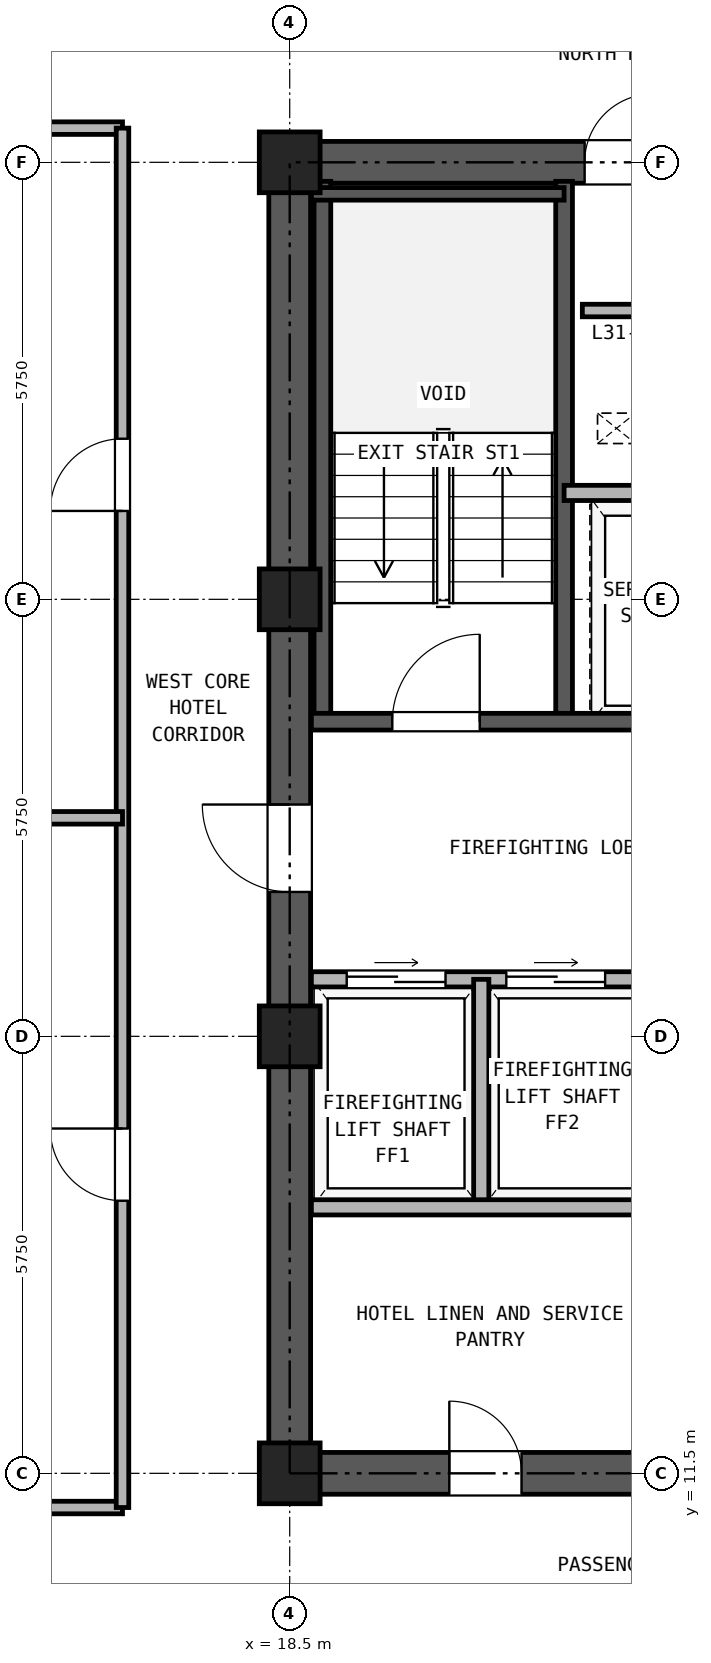
"""IFC4 building model, lengths in metres.
Left out: names, types, materials, properties, quantities, classifications, styles, units other than length and angle.
Written with IfcOpenShell. Run it as: python <this file> out.ifc"""

import sys

from ifc_helpers import new_model, si_unit, direction, frame, frame_2d, origin, origin_2d, place, context, subcontext, project, spatial, rectangle, hollow_rectangle, extrude, source, transform, mapped, element, fill, save


model = new_model("IFC4")
c1 = context("Model", 3, precision=1e-05, world=origin(), true_north=direction((0.0, 1.0)))
c2 = subcontext(c1, "Body", "Model", "MODEL_VIEW")
j1 = project(units=[si_unit("LENGTHUNIT", "METRE"), si_unit("PLANEANGLEUNIT", "RADIAN")], contexts=[c1])
p1 = place(None, origin())
s1 = spatial("IfcSite", under=j1, at=p1, CompositionType="ELEMENT")
p2 = place(p1, origin())
s2 = spatial("IfcBuilding", under=s1, at=p2, CompositionType="ELEMENT")
p3 = place(p2, frame((0.0, 0.0, 115.1)))
s3 = spatial("IfcBuildingStorey", under=s2, at=p3, CompositionType="ELEMENT", Elevation=115.1)
m1 = source(origin(), c2, "Body", "SweptSolid", [
    extrude(hollow_rectangle(XDim=0.8, YDim=0.8, WallThickness=0.045, at=origin_2d()), origin(), (0.0, 0.0, 1.0), 2.95),
])
for number, where, z_axis, x_axis in (
    (1, (18.5, 11.5, 0.0), (0.0, 0.0, 1.0), (1.0, 0.0, 0.0)),
    (2, (18.5, 17.25, 0.0), (0.0, 0.0, 1.0), (1.0, 0.0, 0.0)),
    (3, (18.5, 23.0, 0.0), (0.0, 0.0, 1.0), (1.0, 0.0, 0.0)),
    (4, (18.5, 28.75, 0.0), (0.0, 0.0, 1.0), (1.0, 0.0, 0.0)),
):
    element("IfcColumn", number, at=place(p3, frame(where, z_axis=z_axis, x_axis=x_axis)), inside=s3, PredefinedType="COLUMN", context=c2, shape_type="MappedRepresentation", body=[
        mapped(m1, transform((0.0, 0.0, 0.0), x_axis=(1.0, 0.0, 0.0), y_axis=(0.0, 1.0, 0.0), z_axis=(0.0, 0.0, 1.0), scale=1.0)),
    ])
p4 = place(p3, frame((18.225, 11.5, 0.0), z_axis=(0.0, 0.0, 1.0), x_axis=(1.0, 0.0, 0.0)))
e5 = element("IfcWall", 5, at=p4, inside=s3, PredefinedType="SHEAR", context=c2, shape_type="SweptSolid", body=[
    extrude(rectangle(XDim=10.55, YDim=0.55, at=frame_2d((5.275, 0.0))), origin(), (0.0, 0.0, 1.0), 2.95),
])
p5 = place(p4, frame((2.375, 0.0, 0.0)))
e6 = element("IfcOpeningElement", 6, at=p5, cuts=e5, PredefinedType="OPENING", context=c2, shape_type="SweptSolid", body=[
    extrude(rectangle(XDim=0.95, YDim=2.15, at=frame_2d((0.475, 1.075))), frame((0.0, 0.285, 0.0), z_axis=(0.0, -1.0, 0.0), x_axis=(1.0, 0.0, 0.0)), (0.0, 0.0, 1.0), 0.57),
])
p6 = place(p4, frame((5.875, 0.0, 0.0)))
e7 = element("IfcOpeningElement", 7, at=p6, cuts=e5, PredefinedType="OPENING", context=c2, shape_type="SweptSolid", body=[
    extrude(rectangle(XDim=1.1, YDim=2.25, at=frame_2d((0.55, 1.125))), frame((0.0, 0.285, 0.0), z_axis=(0.0, -1.0, 0.0), x_axis=(1.0, 0.0, 0.0)), (0.0, 0.0, 1.0), 0.57),
])
p7 = place(p4, frame((8.275, 0.0, 0.0)))
e8 = element("IfcOpeningElement", 8, at=p7, cuts=e5, PredefinedType="OPENING", context=c2, shape_type="SweptSolid", body=[
    extrude(rectangle(XDim=1.1, YDim=2.25, at=frame_2d((0.55, 1.125))), frame((0.0, 0.285, 0.0), z_axis=(0.0, -1.0, 0.0), x_axis=(1.0, 0.0, 0.0)), (0.0, 0.0, 1.0), 0.57),
])
p8 = place(p3, frame((18.225, 28.75, 0.0), z_axis=(0.0, 0.0, 1.0), x_axis=(1.0, 0.0, 0.0)))
e9 = element("IfcWall", 9, at=p8, inside=s3, PredefinedType="SHEAR", context=c2, shape_type="SweptSolid", body=[
    extrude(rectangle(XDim=10.55, YDim=0.55, at=frame_2d((5.275, 0.0))), origin(), (0.0, 0.0, 1.0), 2.95),
])
p9 = place(p8, frame((4.155, 0.0, 0.0)))
e10 = element("IfcOpeningElement", 10, at=p9, cuts=e9, PredefinedType="OPENING", context=c2, shape_type="SweptSolid", body=[
    extrude(rectangle(XDim=0.9, YDim=2.05, at=frame_2d((0.45, 1.025))), frame((0.0, 0.285, 0.0), z_axis=(0.0, -1.0, 0.0), x_axis=(1.0, 0.0, 0.0)), (0.0, 0.0, 1.0), 0.57),
])
p10 = place(p8, frame((5.695, 0.0, 0.0)))
e11 = element("IfcOpeningElement", 11, at=p10, cuts=e9, PredefinedType="OPENING", context=c2, shape_type="SweptSolid", body=[
    extrude(rectangle(XDim=0.9, YDim=2.05, at=frame_2d((0.45, 1.025))), frame((0.0, 0.285, 0.0), z_axis=(0.0, -1.0, 0.0), x_axis=(1.0, 0.0, 0.0)), (0.0, 0.0, 1.0), 0.57),
])
p11 = place(p3, frame((18.5, 11.775, 0.0), z_axis=(0.0, 0.0, 1.0), x_axis=(0.0, 1.0, 0.0)))
e12 = element("IfcWall", 12, at=p11, inside=s3, PredefinedType="SHEAR", context=c2, shape_type="SweptSolid", body=[
    extrude(rectangle(XDim=16.7, YDim=0.55, at=frame_2d((8.35, 0.0))), origin(), (0.0, 0.0, 1.0), 2.95),
])
p12 = place(p11, frame((7.375, 0.0, 0.0)))
e13 = element("IfcOpeningElement", 13, at=p12, cuts=e12, PredefinedType="OPENING", context=c2, shape_type="SweptSolid", body=[
    extrude(rectangle(XDim=1.15, YDim=2.2, at=frame_2d((0.575, 1.1))), frame((0.0, 0.285, 0.0), z_axis=(0.0, -1.0, 0.0), x_axis=(1.0, 0.0, 0.0)), (0.0, 0.0, 1.0), 0.57),
])
for number, where, z_axis, x_axis in (
    (14, (18.93, 21.39, 0.0), (0.0, 0.0, 1.0), (0.0, 1.0, 0.0)),
    (15, (22.11, 21.39, 0.0), (0.0, 0.0, 1.0), (0.0, 1.0, 0.0)),
):
    element("IfcWall", number, at=place(p3, frame(where, z_axis=z_axis, x_axis=x_axis)), inside=s3, PredefinedType="SOLIDWALL", context=c2, shape_type="SweptSolid", body=[
        extrude(rectangle(XDim=7.11, YDim=0.22, at=frame_2d((3.555, 0.0))), origin(), (0.0, 0.0, 1.0), 2.95),
    ])
p13 = place(p3, frame((18.785, 28.335, 0.0), z_axis=(0.0, 0.0, 1.0), x_axis=(1.0, 0.0, 0.0)))
e16 = element("IfcWall", 16, at=p13, inside=s3, PredefinedType="PARTITIONING", context=c2, shape_type="SweptSolid", body=[
    extrude(rectangle(XDim=3.325, YDim=0.165, at=frame_2d((1.663, 0.0))), origin(), (0.0, 0.0, 1.0), 2.95),
])
p14 = place(p3, frame((18.785, 21.39, 0.0), z_axis=(0.0, 0.0, 1.0), x_axis=(1.0, 0.0, 0.0)))
e17 = element("IfcWall", 17, at=p14, inside=s3, PredefinedType="SOLIDWALL", context=c2, shape_type="SweptSolid", body=[
    extrude(rectangle(XDim=6.345, YDim=0.22, at=frame_2d((3.172, 0.0))), origin(), (0.0, 0.0, 1.0), 2.95),
])
p15 = place(p14, frame((1.065, 0.0, 0.0)))
e18 = element("IfcOpeningElement", 18, at=p15, cuts=e17, PredefinedType="OPENING", context=c2, shape_type="SweptSolid", body=[
    extrude(rectangle(XDim=1.15, YDim=2.2, at=frame_2d((0.575, 1.1))), frame((0.0, 0.12, 0.0), z_axis=(0.0, -1.0, 0.0), x_axis=(1.0, 0.0, 0.0)), (0.0, 0.0, 1.0), 0.24),
])
p16 = place(p14, frame((4.795, 0.0, 0.0)))
e19 = element("IfcOpeningElement", 19, at=p16, cuts=e17, PredefinedType="OPENING", context=c2, shape_type="SweptSolid", body=[
    extrude(rectangle(XDim=1.1, YDim=2.25, at=frame_2d((0.55, 1.125))), frame((0.0, 0.12, 0.0), z_axis=(0.0, -1.0, 0.0), x_axis=(1.0, 0.0, 0.0)), (0.0, 0.0, 1.0), 0.24),
])
p17 = place(p3, frame((22.11, 24.4, 0.0), z_axis=(0.0, 0.0, 1.0), x_axis=(1.0, 0.0, 0.0)))
e20 = element("IfcWall", 20, at=p17, inside=s3, PredefinedType="PARTITIONING", context=c2, shape_type="SweptSolid", body=[
    extrude(rectangle(XDim=3.02, YDim=0.2, at=frame_2d((1.51, 0.0))), origin(), (0.0, 0.0, 1.0), 2.95),
])
p18 = place(p3, frame((18.785, 18.0, 0.0), z_axis=(0.0, 0.0, 1.0), x_axis=(1.0, 0.0, 0.0)))
e21 = element("IfcWall", 21, at=p18, inside=s3, PredefinedType="PARTITIONING", context=c2, shape_type="SweptSolid", body=[
    extrude(rectangle(XDim=9.43, YDim=0.2, at=frame_2d((4.715, 0.0))), origin(), (0.0, 0.0, 1.0), 2.95),
])
p19 = place(p18, frame((0.465, 0.0, 0.0)))
e22 = element("IfcOpeningElement", 22, at=p19, cuts=e21, PredefinedType="OPENING", context=c2, shape_type="SweptSolid", body=[
    extrude(rectangle(XDim=1.3, YDim=2.3, at=frame_2d((0.65, 1.15))), frame((0.0, 0.11, 0.0), z_axis=(0.0, -1.0, 0.0), x_axis=(1.0, 0.0, 0.0)), (0.0, 0.0, 1.0), 0.22),
])
p20 = place(p18, frame((2.565, 0.0, 0.0)))
e23 = element("IfcOpeningElement", 23, at=p20, cuts=e21, PredefinedType="OPENING", context=c2, shape_type="SweptSolid", body=[
    extrude(rectangle(XDim=1.3, YDim=2.3, at=frame_2d((0.65, 1.15))), frame((0.0, 0.11, 0.0), z_axis=(0.0, -1.0, 0.0), x_axis=(1.0, 0.0, 0.0)), (0.0, 0.0, 1.0), 0.22),
])
p21 = place(p18, frame((7.065, 0.0, 0.0)))
e24 = element("IfcOpeningElement", 24, at=p21, cuts=e21, PredefinedType="OPENING", context=c2, shape_type="SweptSolid", body=[
    extrude(rectangle(XDim=1.0, YDim=2.15, at=frame_2d((0.5, 1.075))), frame((0.0, 0.11, 0.0), z_axis=(0.0, -1.0, 0.0), x_axis=(1.0, 0.0, 0.0)), (0.0, 0.0, 1.0), 0.22),
])
p22 = place(p3, frame((21.02, 15.0, 0.0), z_axis=(0.0, 0.0, 1.0), x_axis=(0.0, 1.0, 0.0)))
e25 = element("IfcWall", 25, at=p22, inside=s3, PredefinedType="PARTITIONING", context=c2, shape_type="SweptSolid", body=[
    extrude(rectangle(XDim=3.0, YDim=0.2, at=frame_2d((1.5, 0.0))), origin(), (0.0, 0.0, 1.0), 2.95),
])
p23 = place(p3, frame((18.785, 15.0, 0.0), z_axis=(0.0, 0.0, 1.0), x_axis=(1.0, 0.0, 0.0)))
e26 = element("IfcWall", 26, at=p23, inside=s3, PredefinedType="PARTITIONING", context=c2, shape_type="SweptSolid", body=[
    extrude(rectangle(XDim=9.43, YDim=0.2, at=frame_2d((4.715, 0.0))), origin(), (0.0, 0.0, 1.0), 2.95),
])
for number, where, z_axis, x_axis in (
    (27, (8.6, 11.05, 0.0), (0.0, 0.0, 1.0), (1.0, 0.0, 0.0)),
    (28, (8.6, 29.2, 0.0), (0.0, 0.0, 1.0), (1.0, 0.0, 0.0)),
):
    element("IfcWall", number, at=place(p3, frame(where, z_axis=z_axis, x_axis=x_axis)), inside=s3, PredefinedType="PARTITIONING", context=c2, shape_type="SweptSolid", body=[
        extrude(rectangle(XDim=7.7, YDim=0.165, at=frame_2d((3.85, 0.0))), origin(), (0.0, 0.0, 1.0), 2.95),
    ])
p24 = place(p3, frame((16.3, 11.05, 0.0), z_axis=(0.0, 0.0, 1.0), x_axis=(0.0, 1.0, 0.0)))
e29 = element("IfcWall", 29, at=p24, inside=s3, PredefinedType="PARTITIONING", context=c2, shape_type="SweptSolid", body=[
    extrude(rectangle(XDim=18.15, YDim=0.165, at=frame_2d((9.075, 0.0))), origin(), (0.0, 0.0, 1.0), 2.95),
])
p25 = place(p24, frame((4.037, 0.0, 0.0)))
e30 = element("IfcOpeningElement", 30, at=p25, cuts=e29, PredefinedType="OPENING", context=c2, shape_type="SweptSolid", body=[
    extrude(rectangle(XDim=0.95, YDim=2.15, at=frame_2d((0.475, 1.075))), frame((0.0, 0.093, 0.0), z_axis=(0.0, -1.0, 0.0), x_axis=(1.0, 0.0, 0.0)), (0.0, 0.0, 1.0), 0.185),
])
p26 = place(p24, frame((13.113, 0.0, 0.0)))
e31 = element("IfcOpeningElement", 31, at=p26, cuts=e29, PredefinedType="OPENING", context=c2, shape_type="SweptSolid", body=[
    extrude(rectangle(XDim=0.95, YDim=2.15, at=frame_2d((0.475, 1.075))), frame((0.0, 0.093, 0.0), z_axis=(0.0, -1.0, 0.0), x_axis=(1.0, 0.0, 0.0)), (0.0, 0.0, 1.0), 0.185),
])
p27 = place(p3, frame((0.16, 20.125, 0.0), z_axis=(0.0, 0.0, 1.0), x_axis=(1.0, 0.0, 0.0)))
e32 = element("IfcWall", 32, at=p27, inside=s3, PredefinedType="PARTITIONING", context=c2, shape_type="SweptSolid", body=[
    extrude(rectangle(XDim=16.14, YDim=0.165, at=frame_2d((8.07, 0.0))), origin(), (0.0, 0.0, 1.0), 2.583),
])
p28 = place(p3, frame((22.35, 26.8, 0.0), z_axis=(0.0, 0.0, 1.0), x_axis=(1.0, 0.0, 0.0)))
e33 = element("IfcWall", 33, at=p28, inside=s3, PredefinedType="PARTITIONING", context=c2, shape_type="SweptSolid", body=[
    extrude(rectangle(XDim=1.1, YDim=0.165, at=frame_2d((0.55, 0.0))), origin(), (0.0, 0.0, 1.0), 2.95),
])
p29 = place(p15, frame((1.15, 0.0, 0.0), z_axis=(0.0, 0.0, 1.0), x_axis=(-1.0, 0.0, 0.0)))
e34 = element("IfcDoor", 34, at=p29, inside=s3, OperationType="SINGLE_SWING_RIGHT", PredefinedType="DOOR", context=c2, shape_type="SweptSolid", body=[
    extrude(rectangle(XDim=1.15, YDim=2.2, at=frame_2d((0.575, 1.1))), frame((0.0, 0.025, 0.0), z_axis=(0.0, -1.0, 0.0), x_axis=(1.0, 0.0, 0.0)), (0.0, 0.0, 1.0), 0.05),
])
fill(e18, e34)
p30 = place(p19, origin())
e35 = element("IfcDoor", 35, at=p30, inside=s3, OperationType="DOUBLE_DOOR_SLIDING", PredefinedType="DOOR", context=c2, shape_type="SweptSolid", body=[
    extrude(rectangle(XDim=1.3, YDim=2.3, at=frame_2d((0.65, 1.15))), frame((0.0, 0.025, 0.0), z_axis=(0.0, -1.0, 0.0), x_axis=(1.0, 0.0, 0.0)), (0.0, 0.0, 1.0), 0.05),
])
fill(e22, e35)
p31 = place(p20, origin())
e36 = element("IfcDoor", 36, at=p31, inside=s3, OperationType="DOUBLE_DOOR_SLIDING", PredefinedType="DOOR", context=c2, shape_type="SweptSolid", body=[
    extrude(rectangle(XDim=1.3, YDim=2.3, at=frame_2d((0.65, 1.15))), frame((0.0, 0.025, 0.0), z_axis=(0.0, -1.0, 0.0), x_axis=(1.0, 0.0, 0.0)), (0.0, 0.0, 1.0), 0.05),
])
fill(e23, e36)
p32 = place(p12, frame((1.15, 0.0, 0.0), z_axis=(0.0, 0.0, 1.0), x_axis=(-1.0, 0.0, 0.0)))
e37 = element("IfcDoor", 37, at=p32, inside=s3, OperationType="SINGLE_SWING_RIGHT", PredefinedType="DOOR", context=c2, shape_type="SweptSolid", body=[
    extrude(rectangle(XDim=1.15, YDim=2.2, at=frame_2d((0.575, 1.1))), frame((0.0, 0.025, 0.0), z_axis=(0.0, -1.0, 0.0), x_axis=(1.0, 0.0, 0.0)), (0.0, 0.0, 1.0), 0.05),
])
fill(e13, e37)
p33 = place(p9, origin())
e38 = element("IfcDoor", 38, at=p33, inside=s3, OperationType="SINGLE_SWING_RIGHT", PredefinedType="DOOR", context=c2, shape_type="SweptSolid", body=[
    extrude(rectangle(XDim=0.9, YDim=2.05, at=frame_2d((0.45, 1.025))), frame((0.0, 0.025, 0.0), z_axis=(0.0, -1.0, 0.0), x_axis=(1.0, 0.0, 0.0)), (0.0, 0.0, 1.0), 0.05),
])
fill(e10, e38)
p34 = place(p5, frame((0.95, 0.0, 0.0), z_axis=(0.0, 0.0, 1.0), x_axis=(-1.0, 0.0, 0.0)))
e39 = element("IfcDoor", 39, at=p34, inside=s3, OperationType="SINGLE_SWING_LEFT", PredefinedType="DOOR", context=c2, shape_type="SweptSolid", body=[
    extrude(rectangle(XDim=0.95, YDim=2.15, at=frame_2d((0.475, 1.075))), frame((0.0, 0.025, 0.0), z_axis=(0.0, -1.0, 0.0), x_axis=(1.0, 0.0, 0.0)), (0.0, 0.0, 1.0), 0.05),
])
fill(e6, e39)
p35 = place(p25, frame((0.95, 0.0, 0.0), z_axis=(0.0, 0.0, 1.0), x_axis=(-1.0, 0.0, 0.0)))
e40 = element("IfcDoor", 40, at=p35, inside=s3, OperationType="SINGLE_SWING_RIGHT", PredefinedType="DOOR", context=c2, shape_type="SweptSolid", body=[
    extrude(rectangle(XDim=0.95, YDim=2.15, at=frame_2d((0.475, 1.075))), frame((0.0, 0.025, 0.0), z_axis=(0.0, -1.0, 0.0), x_axis=(1.0, 0.0, 0.0)), (0.0, 0.0, 1.0), 0.05),
])
fill(e30, e40)
p36 = place(p26, frame((0.95, 0.0, 0.0), z_axis=(0.0, 0.0, 1.0), x_axis=(-1.0, 0.0, 0.0)))
e41 = element("IfcDoor", 41, at=p36, inside=s3, OperationType="SINGLE_SWING_LEFT", PredefinedType="DOOR", context=c2, shape_type="SweptSolid", body=[
    extrude(rectangle(XDim=0.95, YDim=2.15, at=frame_2d((0.475, 1.075))), frame((0.0, 0.025, 0.0), z_axis=(0.0, -1.0, 0.0), x_axis=(1.0, 0.0, 0.0)), (0.0, 0.0, 1.0), 0.05),
])
fill(e31, e41)
save(model, sys.argv[1])
